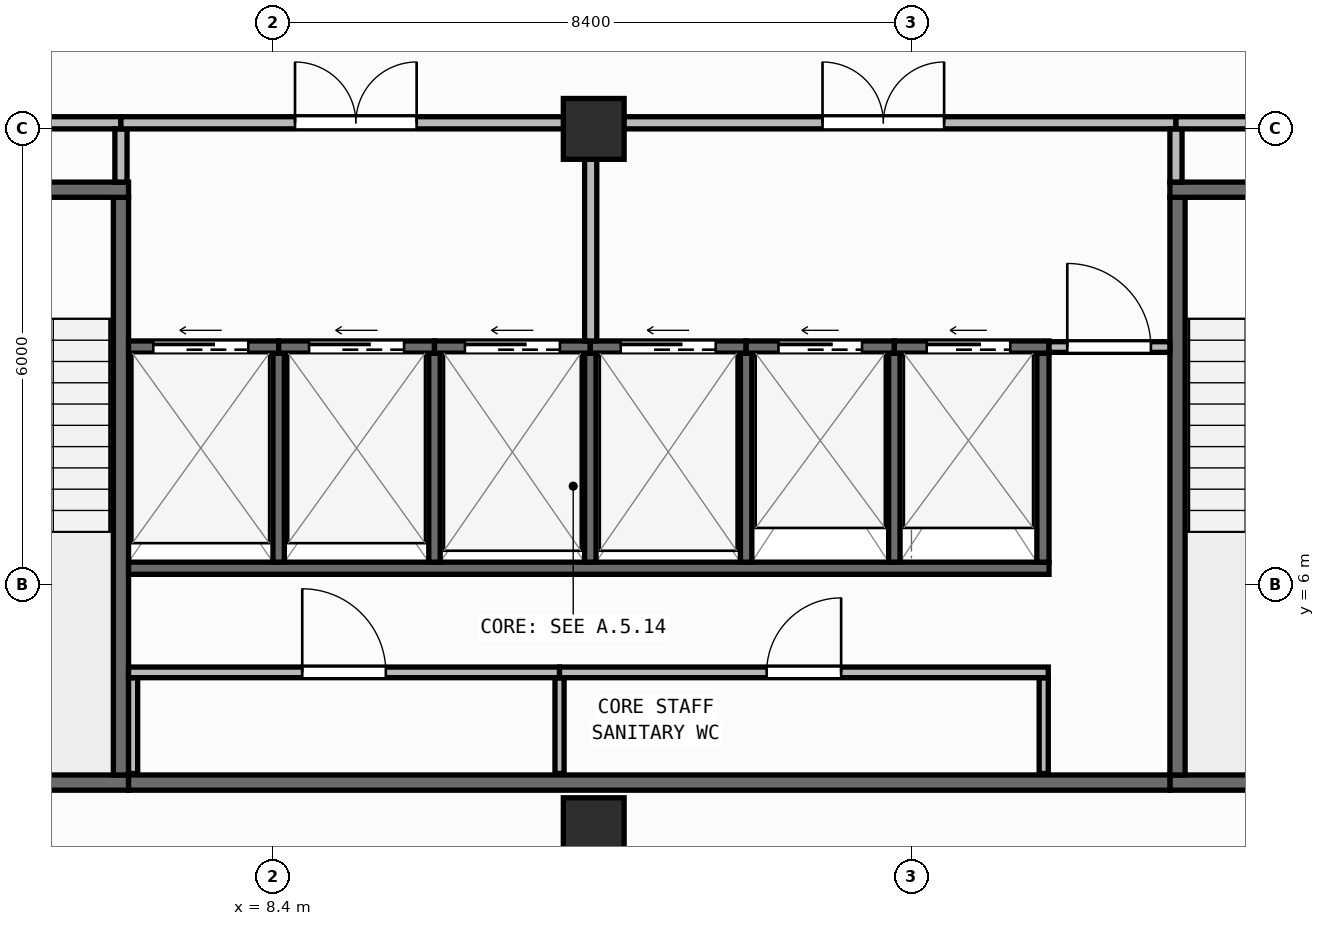
"""IFC4 building model, lengths in metres.
Left out: names, types, materials, properties, quantities, classifications, styles, units other than length and angle.
Written with IfcOpenShell. Run it as: python <this file> out.ifc"""

import sys

from ifc_helpers import new_model, si_unit, direction, frame, frame_2d, origin, origin_2d, place, context, subcontext, project, spatial, rectangle, extrude, element, fill, save


model = new_model("IFC4")
c1 = context("Model", 3, precision=1e-05, world=origin(), true_north=direction((0.0, 1.0)))
c2 = subcontext(c1, "Body", "Model", "MODEL_VIEW")
j1 = project(units=[si_unit("LENGTHUNIT", "METRE"), si_unit("PLANEANGLEUNIT", "RADIAN")], contexts=[c1])
p1 = place(None, origin())
s1 = spatial("IfcSite", under=j1, at=p1, CompositionType="ELEMENT")
p2 = place(p1, origin())
s2 = spatial("IfcBuilding", under=s1, at=p2, CompositionType="ELEMENT")
p3 = place(p2, frame((0.0, 0.0, 276.3)))
s3 = spatial("IfcBuildingStorey", under=s2, at=p3, CompositionType="ELEMENT", Elevation=276.3)
for number, where, z_axis, x_axis in (
    (1, (12.62, 2.8, 0.0), (0.0, 0.0, 1.0), (1.0, 0.0, 0.0)),
    (2, (12.62, 12.0, 0.0), (0.0, 0.0, 1.0), (1.0, 0.0, 0.0)),
):
    element("IfcColumn", number, at=place(p3, frame(where, z_axis=z_axis, x_axis=x_axis)), inside=s3, PredefinedType="COLUMN", context=c2, shape_type="SweptSolid", body=[
        extrude(rectangle(XDim=0.8, YDim=0.8, at=origin_2d()), origin(), (0.0, 0.0, 1.0), 3.95),
    ])
p4 = place(p3, frame((2.46, 0.172, 0.0), z_axis=(0.0, 0.0, 1.0), x_axis=(0.997289775118, 0.073573802713, 0.0)))
e3 = element("IfcWall", 3, at=p4, inside=s3, PredefinedType="STANDARD", context=c2, shape_type="SweptSolid", body=[
    extrude(rectangle(XDim=36.379, YDim=0.26, at=frame_2d((18.189, 0.0))), origin(), (0.0, 0.0, 1.0), 3.71),
])
p5 = place(p4, frame((16.989, 0.0, 0.9)))
e4 = element("IfcOpeningElement", 4, at=p5, cuts=e3, PredefinedType="OPENING", context=c2, shape_type="SweptSolid", body=[
    extrude(rectangle(XDim=2.4, YDim=1.65, at=frame_2d((1.2, 0.825))), frame((0.0, 0.14, 0.0), z_axis=(0.0, -1.0, 0.0), x_axis=(1.0, 0.0, 0.0)), (0.0, 0.0, 1.0), 0.28),
])
p6 = place(p3, frame((2.8, 3.4, 0.0), z_axis=(0.0, 0.0, 1.0), x_axis=(1.0, 0.0, 0.0)))
e5 = element("IfcWall", 5, at=p6, inside=s3, PredefinedType="SHEAR", context=c2, shape_type="SweptSolid", body=[
    extrude(rectangle(XDim=3.7, YDim=0.2, at=frame_2d((1.85, 0.0))), origin(), (0.0, 0.0, 1.0), 3.71),
])
p7 = place(p3, frame((6.4, 3.5, 0.0), z_axis=(0.0, 0.0, 1.0), x_axis=(0.0, 1.0, 0.0)))
e6 = element("IfcWall", 6, at=p7, inside=s3, PredefinedType="SHEAR", context=c2, shape_type="SweptSolid", body=[
    extrude(rectangle(XDim=7.6, YDim=0.2, at=frame_2d((3.8, 0.0))), origin(), (0.0, 0.0, 1.0), 3.71),
])
p8 = place(p3, frame((2.8, 11.2, 0.0), z_axis=(0.0, 0.0, 1.0), x_axis=(1.0, 0.0, 0.0)))
e7 = element("IfcWall", 7, at=p8, inside=s3, PredefinedType="SHEAR", context=c2, shape_type="SweptSolid", body=[
    extrude(rectangle(XDim=3.7, YDim=0.2, at=frame_2d((1.85, 0.0))), origin(), (0.0, 0.0, 1.0), 3.71),
])
p9 = place(p8, frame((1.2, 0.0, 0.0)))
e8 = element("IfcOpeningElement", 8, at=p9, cuts=e7, PredefinedType="OPENING", context=c2, shape_type="SweptSolid", body=[
    extrude(rectangle(XDim=1.3, YDim=2.15, at=frame_2d((0.65, 1.075))), frame((0.0, 0.11, 0.0), z_axis=(0.0, -1.0, 0.0), x_axis=(1.0, 0.0, 0.0)), (0.0, 0.0, 1.0), 0.22),
])
p10 = place(p3, frame((20.2, 3.4, 0.0), z_axis=(0.0, 0.0, 1.0), x_axis=(1.0, 0.0, 0.0)))
e9 = element("IfcWall", 9, at=p10, inside=s3, PredefinedType="SHEAR", context=c2, shape_type="SweptSolid", body=[
    extrude(rectangle(XDim=3.7, YDim=0.2, at=frame_2d((1.85, 0.0))), origin(), (0.0, 0.0, 1.0), 3.71),
])
p11 = place(p3, frame((20.3, 3.5, 0.0), z_axis=(0.0, 0.0, 1.0), x_axis=(0.0, 1.0, 0.0)))
e10 = element("IfcWall", 10, at=p11, inside=s3, PredefinedType="SHEAR", context=c2, shape_type="SweptSolid", body=[
    extrude(rectangle(XDim=7.6, YDim=0.2, at=frame_2d((3.8, 0.0))), origin(), (0.0, 0.0, 1.0), 3.71),
])
p12 = place(p3, frame((20.2, 11.2, 0.0), z_axis=(0.0, 0.0, 1.0), x_axis=(1.0, 0.0, 0.0)))
e11 = element("IfcWall", 11, at=p12, inside=s3, PredefinedType="SHEAR", context=c2, shape_type="SweptSolid", body=[
    extrude(rectangle(XDim=3.7, YDim=0.2, at=frame_2d((1.85, 0.0))), origin(), (0.0, 0.0, 1.0), 3.71),
])
p13 = place(p12, frame((1.2, 0.0, 0.0)))
e12 = element("IfcOpeningElement", 12, at=p13, cuts=e11, PredefinedType="OPENING", context=c2, shape_type="SweptSolid", body=[
    extrude(rectangle(XDim=1.3, YDim=2.15, at=frame_2d((0.65, 1.075))), frame((0.0, 0.11, 0.0), z_axis=(0.0, -1.0, 0.0), x_axis=(1.0, 0.0, 0.0)), (0.0, 0.0, 1.0), 0.22),
])
p14 = place(p3, frame((6.5, 3.4, 0.0), z_axis=(0.0, 0.0, 1.0), x_axis=(1.0, 0.0, 0.0)))
e13 = element("IfcWall", 13, at=p14, inside=s3, PredefinedType="SHEAR", context=c2, shape_type="SweptSolid", body=[
    extrude(rectangle(XDim=13.7, YDim=0.2, at=frame_2d((6.85, 0.0))), origin(), (0.0, 0.0, 1.0), 3.71),
])
p15 = place(p3, frame((6.5, 6.22, 0.0), z_axis=(0.0, 0.0, 1.0), x_axis=(1.0, 0.0, 0.0)))
e14 = element("IfcWall", 14, at=p15, inside=s3, PredefinedType="SHEAR", context=c2, shape_type="SweptSolid", body=[
    extrude(rectangle(XDim=12.11, YDim=0.16, at=frame_2d((6.055, 0.0))), origin(), (0.0, 0.0, 1.0), 3.71),
])
p16 = place(p3, frame((18.53, 6.3, 0.0), z_axis=(0.0, 0.0, 1.0), x_axis=(0.0, 1.0, 0.0)))
e15 = element("IfcWall", 15, at=p16, inside=s3, PredefinedType="SHEAR", context=c2, shape_type="SweptSolid", body=[
    extrude(rectangle(XDim=2.75, YDim=0.16, at=frame_2d((1.375, 0.0))), origin(), (0.0, 0.0, 1.0), 3.71),
])
for number, where, z_axis, x_axis in (
    (16, (8.475, 6.3, 0.0), (0.0, 0.0, 1.0), (0.0, 1.0, 0.0)),
    (17, (10.525, 6.3, 0.0), (0.0, 0.0, 1.0), (0.0, 1.0, 0.0)),
    (18, (12.575, 6.3, 0.0), (0.0, 0.0, 1.0), (0.0, 1.0, 0.0)),
    (19, (14.625, 6.3, 0.0), (0.0, 0.0, 1.0), (0.0, 1.0, 0.0)),
    (20, (16.575, 6.3, 0.0), (0.0, 0.0, 1.0), (0.0, 1.0, 0.0)),
):
    element("IfcWall", number, at=place(p3, frame(where, z_axis=z_axis, x_axis=x_axis)), inside=s3, PredefinedType="SHEAR", context=c2, shape_type="SweptSolid", body=[
        extrude(rectangle(XDim=2.75, YDim=0.15, at=frame_2d((1.375, 0.0))), origin(), (0.0, 0.0, 1.0), 3.71),
    ])
p17 = place(p3, frame((6.5, 9.13, 0.0), z_axis=(0.0, 0.0, 1.0), x_axis=(1.0, 0.0, 0.0)))
e21 = element("IfcWall", 21, at=p17, inside=s3, PredefinedType="SHEAR", context=c2, shape_type="SweptSolid", body=[
    extrude(rectangle(XDim=1.975, YDim=0.16, at=frame_2d((0.988, 0.0))), origin(), (0.0, 0.0, 1.0), 3.71),
])
p18 = place(p17, frame((0.325, 0.0, 0.0)))
e22 = element("IfcOpeningElement", 22, at=p18, cuts=e21, PredefinedType="OPENING", context=c2, shape_type="SweptSolid", body=[
    extrude(rectangle(XDim=1.25, YDim=2.15, at=frame_2d((0.625, 1.075))), frame((0.0, 0.09, 0.0), z_axis=(0.0, -1.0, 0.0), x_axis=(1.0, 0.0, 0.0)), (0.0, 0.0, 1.0), 0.18),
])
p19 = place(p3, frame((8.475, 9.13, 0.0), z_axis=(0.0, 0.0, 1.0), x_axis=(1.0, 0.0, 0.0)))
e23 = element("IfcWall", 23, at=p19, inside=s3, PredefinedType="SHEAR", context=c2, shape_type="SweptSolid", body=[
    extrude(rectangle(XDim=2.05, YDim=0.16, at=frame_2d((1.025, 0.0))), origin(), (0.0, 0.0, 1.0), 3.71),
])
p20 = place(p19, frame((0.4, 0.0, 0.0)))
e24 = element("IfcOpeningElement", 24, at=p20, cuts=e23, PredefinedType="OPENING", context=c2, shape_type="SweptSolid", body=[
    extrude(rectangle(XDim=1.25, YDim=2.15, at=frame_2d((0.625, 1.075))), frame((0.0, 0.09, 0.0), z_axis=(0.0, -1.0, 0.0), x_axis=(1.0, 0.0, 0.0)), (0.0, 0.0, 1.0), 0.18),
])
p21 = place(p3, frame((10.525, 9.13, 0.0), z_axis=(0.0, 0.0, 1.0), x_axis=(1.0, 0.0, 0.0)))
e25 = element("IfcWall", 25, at=p21, inside=s3, PredefinedType="SHEAR", context=c2, shape_type="SweptSolid", body=[
    extrude(rectangle(XDim=2.05, YDim=0.16, at=frame_2d((1.025, 0.0))), origin(), (0.0, 0.0, 1.0), 3.71),
])
p22 = place(p21, frame((0.4, 0.0, 0.0)))
e26 = element("IfcOpeningElement", 26, at=p22, cuts=e25, PredefinedType="OPENING", context=c2, shape_type="SweptSolid", body=[
    extrude(rectangle(XDim=1.25, YDim=2.15, at=frame_2d((0.625, 1.075))), frame((0.0, 0.09, 0.0), z_axis=(0.0, -1.0, 0.0), x_axis=(1.0, 0.0, 0.0)), (0.0, 0.0, 1.0), 0.18),
])
p23 = place(p3, frame((12.575, 9.13, 0.0), z_axis=(0.0, 0.0, 1.0), x_axis=(1.0, 0.0, 0.0)))
e27 = element("IfcWall", 27, at=p23, inside=s3, PredefinedType="SHEAR", context=c2, shape_type="SweptSolid", body=[
    extrude(rectangle(XDim=2.05, YDim=0.16, at=frame_2d((1.025, 0.0))), origin(), (0.0, 0.0, 1.0), 3.71),
])
p24 = place(p23, frame((0.4, 0.0, 0.0)))
e28 = element("IfcOpeningElement", 28, at=p24, cuts=e27, PredefinedType="OPENING", context=c2, shape_type="SweptSolid", body=[
    extrude(rectangle(XDim=1.25, YDim=2.15, at=frame_2d((0.625, 1.075))), frame((0.0, 0.09, 0.0), z_axis=(0.0, -1.0, 0.0), x_axis=(1.0, 0.0, 0.0)), (0.0, 0.0, 1.0), 0.18),
])
p25 = place(p3, frame((14.625, 9.13, 0.0), z_axis=(0.0, 0.0, 1.0), x_axis=(1.0, 0.0, 0.0)))
e29 = element("IfcWall", 29, at=p25, inside=s3, PredefinedType="SHEAR", context=c2, shape_type="SweptSolid", body=[
    extrude(rectangle(XDim=1.95, YDim=0.16, at=frame_2d((0.975, 0.0))), origin(), (0.0, 0.0, 1.0), 3.71),
])
p26 = place(p25, frame((0.425, 0.0, 0.0)))
e30 = element("IfcOpeningElement", 30, at=p26, cuts=e29, PredefinedType="OPENING", context=c2, shape_type="SweptSolid", body=[
    extrude(rectangle(XDim=1.1, YDim=2.15, at=frame_2d((0.55, 1.075))), frame((0.0, 0.09, 0.0), z_axis=(0.0, -1.0, 0.0), x_axis=(1.0, 0.0, 0.0)), (0.0, 0.0, 1.0), 0.18),
])
p27 = place(p3, frame((16.575, 9.13, 0.0), z_axis=(0.0, 0.0, 1.0), x_axis=(1.0, 0.0, 0.0)))
e31 = element("IfcWall", 31, at=p27, inside=s3, PredefinedType="SHEAR", context=c2, shape_type="SweptSolid", body=[
    extrude(rectangle(XDim=2.035, YDim=0.16, at=frame_2d((1.018, 0.0))), origin(), (0.0, 0.0, 1.0), 3.71),
])
p28 = place(p27, frame((0.425, 0.0, 0.0)))
e32 = element("IfcOpeningElement", 32, at=p28, cuts=e31, PredefinedType="OPENING", context=c2, shape_type="SweptSolid", body=[
    extrude(rectangle(XDim=1.1, YDim=2.15, at=frame_2d((0.55, 1.075))), frame((0.0, 0.09, 0.0), z_axis=(0.0, -1.0, 0.0), x_axis=(1.0, 0.0, 0.0)), (0.0, 0.0, 1.0), 0.18),
])
for number, where, z_axis, x_axis in (
    (33, (6.56, 3.52, 0.0), (0.0, 0.0, 1.0), (0.0, 1.0, 0.0)),
    (34, (12.17, 3.52, 0.0), (0.0, 0.0, 1.0), (0.0, 1.0, 0.0)),
    (35, (18.54, 3.52, 0.0), (0.0, 0.0, 1.0), (0.0, 1.0, 0.0)),
):
    element("IfcWall", number, at=place(p3, frame(where, z_axis=z_axis, x_axis=x_axis)), inside=s3, PredefinedType="PARTITIONING", context=c2, shape_type="SweptSolid", body=[
        extrude(rectangle(XDim=1.26, YDim=0.12, at=frame_2d((0.63, 0.0))), origin(), (0.0, 0.0, 1.0), 3.71),
    ])
p29 = place(p3, frame((6.5, 4.85, 0.0), z_axis=(0.0, 0.0, 1.0), x_axis=(1.0, 0.0, 0.0)))
e36 = element("IfcWall", 36, at=p29, inside=s3, PredefinedType="PARTITIONING", context=c2, shape_type="SweptSolid", body=[
    extrude(rectangle(XDim=5.67, YDim=0.14, at=frame_2d((2.835, 0.0))), origin(), (0.0, 0.0, 1.0), 3.71),
])
p30 = place(p29, frame((2.285, 0.0, 0.0)))
e37 = element("IfcOpeningElement", 37, at=p30, cuts=e36, PredefinedType="OPENING", context=c2, shape_type="SweptSolid", body=[
    extrude(rectangle(XDim=1.1, YDim=2.1, at=frame_2d((0.55, 1.05))), frame((0.0, 0.08, 0.0), z_axis=(0.0, -1.0, 0.0), x_axis=(1.0, 0.0, 0.0)), (0.0, 0.0, 1.0), 0.16),
])
p31 = place(p3, frame((12.17, 4.85, 0.0), z_axis=(0.0, 0.0, 1.0), x_axis=(1.0, 0.0, 0.0)))
e38 = element("IfcWall", 38, at=p31, inside=s3, PredefinedType="PARTITIONING", context=c2, shape_type="SweptSolid", body=[
    extrude(rectangle(XDim=6.43, YDim=0.14, at=frame_2d((3.215, 0.0))), origin(), (0.0, 0.0, 1.0), 3.71),
])
p32 = place(p31, frame((2.725, 0.0, 0.0)))
e39 = element("IfcOpeningElement", 39, at=p32, cuts=e38, PredefinedType="OPENING", context=c2, shape_type="SweptSolid", body=[
    extrude(rectangle(XDim=0.98, YDim=2.1, at=frame_2d((0.49, 1.05))), frame((0.0, 0.08, 0.0), z_axis=(0.0, -1.0, 0.0), x_axis=(1.0, 0.0, 0.0)), (0.0, 0.0, 1.0), 0.16),
])
p33 = place(p3, frame((18.61, 9.13, 0.0), z_axis=(0.0, 0.0, 1.0), x_axis=(1.0, 0.0, 0.0)))
e40 = element("IfcWall", 40, at=p33, inside=s3, PredefinedType="PARTITIONING", context=c2, shape_type="SweptSolid", body=[
    extrude(rectangle(XDim=1.59, YDim=0.14, at=frame_2d((0.795, 0.0))), origin(), (0.0, 0.0, 1.0), 3.71),
])
p34 = place(p33, frame((0.24, 0.0, 0.0)))
e41 = element("IfcOpeningElement", 41, at=p34, cuts=e40, PredefinedType="OPENING", context=c2, shape_type="SweptSolid", body=[
    extrude(rectangle(XDim=1.1, YDim=2.1, at=frame_2d((0.55, 1.05))), frame((0.0, 0.08, 0.0), z_axis=(0.0, -1.0, 0.0), x_axis=(1.0, 0.0, 0.0)), (0.0, 0.0, 1.0), 0.16),
])
p35 = place(p3, frame((2.8, 12.08, 0.0), z_axis=(0.0, 0.0, 1.0), x_axis=(1.0, 0.0, 0.0)))
e42 = element("IfcWall", 42, at=p35, inside=s3, PredefinedType="PARTITIONING", context=c2, shape_type="SweptSolid", body=[
    extrude(rectangle(XDim=3.6, YDim=0.16, at=frame_2d((1.8, 0.0))), origin(), (0.0, 0.0, 1.0), 3.157),
])
p36 = place(p35, frame((1.0, 0.0, 0.0)))
e43 = element("IfcOpeningElement", 43, at=p36, cuts=e42, PredefinedType="OPENING", context=c2, shape_type="SweptSolid", body=[
    extrude(rectangle(XDim=1.6, YDim=2.05, at=frame_2d((0.8, 1.025))), frame((0.0, 0.09, 0.0), z_axis=(0.0, -1.0, 0.0), x_axis=(1.0, 0.0, 0.0)), (0.0, 0.0, 1.0), 0.18),
])
p37 = place(p3, frame((6.4, 11.3, 0.0), z_axis=(0.0, 0.0, 1.0), x_axis=(0.0, 1.0, 0.0)))
e44 = element("IfcWall", 44, at=p37, inside=s3, PredefinedType="PARTITIONING", context=c2, shape_type="SweptSolid", body=[
    extrude(rectangle(XDim=0.7, YDim=0.16, at=frame_2d((0.35, 0.0))), origin(), (0.0, 0.0, 1.0), 3.71),
])
p38 = place(p3, frame((6.4, 12.08, 0.0), z_axis=(0.0, 0.0, 1.0), x_axis=(1.0, 0.0, 0.0)))
e45 = element("IfcWall", 45, at=p38, inside=s3, PredefinedType="PARTITIONING", context=c2, shape_type="SweptSolid", body=[
    extrude(rectangle(XDim=6.18, YDim=0.16, at=frame_2d((3.09, 0.0))), origin(), (0.0, 0.0, 1.0), 3.157),
])
p39 = place(p38, frame((2.29, 0.0, 0.0)))
e46 = element("IfcOpeningElement", 46, at=p39, cuts=e45, PredefinedType="OPENING", context=c2, shape_type="SweptSolid", body=[
    extrude(rectangle(XDim=1.6, YDim=2.05, at=frame_2d((0.8, 1.025))), frame((0.0, 0.09, 0.0), z_axis=(0.0, -1.0, 0.0), x_axis=(1.0, 0.0, 0.0)), (0.0, 0.0, 1.0), 0.18),
])
p40 = place(p3, frame((12.58, 9.21, 0.0), z_axis=(0.0, 0.0, 1.0), x_axis=(0.0, 1.0, 0.0)))
e47 = element("IfcWall", 47, at=p40, inside=s3, PredefinedType="PARTITIONING", context=c2, shape_type="SweptSolid", body=[
    extrude(rectangle(XDim=2.79, YDim=0.16, at=frame_2d((1.395, 0.0))), origin(), (0.0, 0.0, 1.0), 3.71),
])
p41 = place(p3, frame((12.58, 12.08, 0.0), z_axis=(0.0, 0.0, 1.0), x_axis=(1.0, 0.0, 0.0)))
e48 = element("IfcWall", 48, at=p41, inside=s3, PredefinedType="PARTITIONING", context=c2, shape_type="SweptSolid", body=[
    extrude(rectangle(XDim=7.7, YDim=0.16, at=frame_2d((3.85, 0.0))), origin(), (0.0, 0.0, 1.0), 3.157),
])
p42 = place(p41, frame((3.05, 0.0, 0.0)))
e49 = element("IfcOpeningElement", 49, at=p42, cuts=e48, PredefinedType="OPENING", context=c2, shape_type="SweptSolid", body=[
    extrude(rectangle(XDim=1.6, YDim=2.05, at=frame_2d((0.8, 1.025))), frame((0.0, 0.09, 0.0), z_axis=(0.0, -1.0, 0.0), x_axis=(1.0, 0.0, 0.0)), (0.0, 0.0, 1.0), 0.18),
])
p43 = place(p3, frame((20.28, 11.3, 0.0), z_axis=(0.0, 0.0, 1.0), x_axis=(0.0, 1.0, 0.0)))
e50 = element("IfcWall", 50, at=p43, inside=s3, PredefinedType="PARTITIONING", context=c2, shape_type="SweptSolid", body=[
    extrude(rectangle(XDim=0.7, YDim=0.16, at=frame_2d((0.35, 0.0))), origin(), (0.0, 0.0, 1.0), 3.71),
])
p44 = place(p3, frame((20.28, 12.08, 0.0), z_axis=(0.0, 0.0, 1.0), x_axis=(1.0, 0.0, 0.0)))
e51 = element("IfcWall", 51, at=p44, inside=s3, PredefinedType="PARTITIONING", context=c2, shape_type="SweptSolid", body=[
    extrude(rectangle(XDim=3.62, YDim=0.16, at=frame_2d((1.81, 0.0))), origin(), (0.0, 0.0, 1.0), 3.157),
])
p45 = place(p44, frame((1.01, 0.0, 0.0)))
e52 = element("IfcOpeningElement", 52, at=p45, cuts=e51, PredefinedType="OPENING", context=c2, shape_type="SweptSolid", body=[
    extrude(rectangle(XDim=1.6, YDim=2.05, at=frame_2d((0.8, 1.025))), frame((0.0, 0.09, 0.0), z_axis=(0.0, -1.0, 0.0), x_axis=(1.0, 0.0, 0.0)), (0.0, 0.0, 1.0), 0.18),
])
p46 = place(p18, origin())
e53 = element("IfcDoor", 53, at=p46, inside=s3, OperationType="SLIDING_TO_LEFT", PredefinedType="DOOR", context=c2, shape_type="SweptSolid", body=[
    extrude(rectangle(XDim=1.25, YDim=2.15, at=frame_2d((0.625, 1.075))), frame((0.0, 0.025, 0.0), z_axis=(0.0, -1.0, 0.0), x_axis=(1.0, 0.0, 0.0)), (0.0, 0.0, 1.0), 0.05),
])
fill(e22, e53)
p47 = place(p20, origin())
e54 = element("IfcDoor", 54, at=p47, inside=s3, OperationType="SLIDING_TO_LEFT", PredefinedType="DOOR", context=c2, shape_type="SweptSolid", body=[
    extrude(rectangle(XDim=1.25, YDim=2.15, at=frame_2d((0.625, 1.075))), frame((0.0, 0.025, 0.0), z_axis=(0.0, -1.0, 0.0), x_axis=(1.0, 0.0, 0.0)), (0.0, 0.0, 1.0), 0.05),
])
fill(e24, e54)
p48 = place(p22, origin())
e55 = element("IfcDoor", 55, at=p48, inside=s3, OperationType="SLIDING_TO_LEFT", PredefinedType="DOOR", context=c2, shape_type="SweptSolid", body=[
    extrude(rectangle(XDim=1.25, YDim=2.15, at=frame_2d((0.625, 1.075))), frame((0.0, 0.025, 0.0), z_axis=(0.0, -1.0, 0.0), x_axis=(1.0, 0.0, 0.0)), (0.0, 0.0, 1.0), 0.05),
])
fill(e26, e55)
p49 = place(p24, origin())
e56 = element("IfcDoor", 56, at=p49, inside=s3, OperationType="SLIDING_TO_LEFT", PredefinedType="DOOR", context=c2, shape_type="SweptSolid", body=[
    extrude(rectangle(XDim=1.25, YDim=2.15, at=frame_2d((0.625, 1.075))), frame((0.0, 0.025, 0.0), z_axis=(0.0, -1.0, 0.0), x_axis=(1.0, 0.0, 0.0)), (0.0, 0.0, 1.0), 0.05),
])
fill(e28, e56)
p50 = place(p26, origin())
e57 = element("IfcDoor", 57, at=p50, inside=s3, OperationType="SLIDING_TO_LEFT", PredefinedType="DOOR", context=c2, shape_type="SweptSolid", body=[
    extrude(rectangle(XDim=1.1, YDim=2.15, at=frame_2d((0.55, 1.075))), frame((0.0, 0.025, 0.0), z_axis=(0.0, -1.0, 0.0), x_axis=(1.0, 0.0, 0.0)), (0.0, 0.0, 1.0), 0.05),
])
fill(e30, e57)
p51 = place(p28, origin())
e58 = element("IfcDoor", 58, at=p51, inside=s3, OperationType="SLIDING_TO_LEFT", PredefinedType="DOOR", context=c2, shape_type="SweptSolid", body=[
    extrude(rectangle(XDim=1.1, YDim=2.15, at=frame_2d((0.55, 1.075))), frame((0.0, 0.025, 0.0), z_axis=(0.0, -1.0, 0.0), x_axis=(1.0, 0.0, 0.0)), (0.0, 0.0, 1.0), 0.05),
])
fill(e32, e58)
p52 = place(p30, origin())
e59 = element("IfcDoor", 59, at=p52, inside=s3, OperationType="SINGLE_SWING_LEFT", PredefinedType="DOOR", context=c2, shape_type="SweptSolid", body=[
    extrude(rectangle(XDim=1.1, YDim=2.1, at=frame_2d((0.55, 1.05))), frame((0.0, 0.025, 0.0), z_axis=(0.0, -1.0, 0.0), x_axis=(1.0, 0.0, 0.0)), (0.0, 0.0, 1.0), 0.05),
])
fill(e37, e59)
p53 = place(p32, origin())
e60 = element("IfcDoor", 60, at=p53, inside=s3, OperationType="SINGLE_SWING_RIGHT", PredefinedType="DOOR", context=c2, shape_type="SweptSolid", body=[
    extrude(rectangle(XDim=0.98, YDim=2.1, at=frame_2d((0.49, 1.05))), frame((0.0, 0.025, 0.0), z_axis=(0.0, -1.0, 0.0), x_axis=(1.0, 0.0, 0.0)), (0.0, 0.0, 1.0), 0.05),
])
fill(e39, e60)
p54 = place(p34, origin())
e61 = element("IfcDoor", 61, at=p54, inside=s3, OperationType="SINGLE_SWING_LEFT", PredefinedType="DOOR", context=c2, shape_type="SweptSolid", body=[
    extrude(rectangle(XDim=1.1, YDim=2.1, at=frame_2d((0.55, 1.05))), frame((0.0, 0.025, 0.0), z_axis=(0.0, -1.0, 0.0), x_axis=(1.0, 0.0, 0.0)), (0.0, 0.0, 1.0), 0.05),
])
fill(e41, e61)
p55 = place(p39, origin())
e62 = element("IfcDoor", 62, at=p55, inside=s3, OperationType="DOUBLE_DOOR_SINGLE_SWING", PredefinedType="DOOR", context=c2, shape_type="SweptSolid", body=[
    extrude(rectangle(XDim=1.6, YDim=2.05, at=frame_2d((0.8, 1.025))), frame((0.0, 0.025, 0.0), z_axis=(0.0, -1.0, 0.0), x_axis=(1.0, 0.0, 0.0)), (0.0, 0.0, 1.0), 0.05),
])
fill(e46, e62)
p56 = place(p42, origin())
e63 = element("IfcDoor", 63, at=p56, inside=s3, OperationType="DOUBLE_DOOR_SINGLE_SWING", PredefinedType="DOOR", context=c2, shape_type="SweptSolid", body=[
    extrude(rectangle(XDim=1.6, YDim=2.05, at=frame_2d((0.8, 1.025))), frame((0.0, 0.025, 0.0), z_axis=(0.0, -1.0, 0.0), x_axis=(1.0, 0.0, 0.0)), (0.0, 0.0, 1.0), 0.05),
])
fill(e49, e63)
save(model, sys.argv[1])
